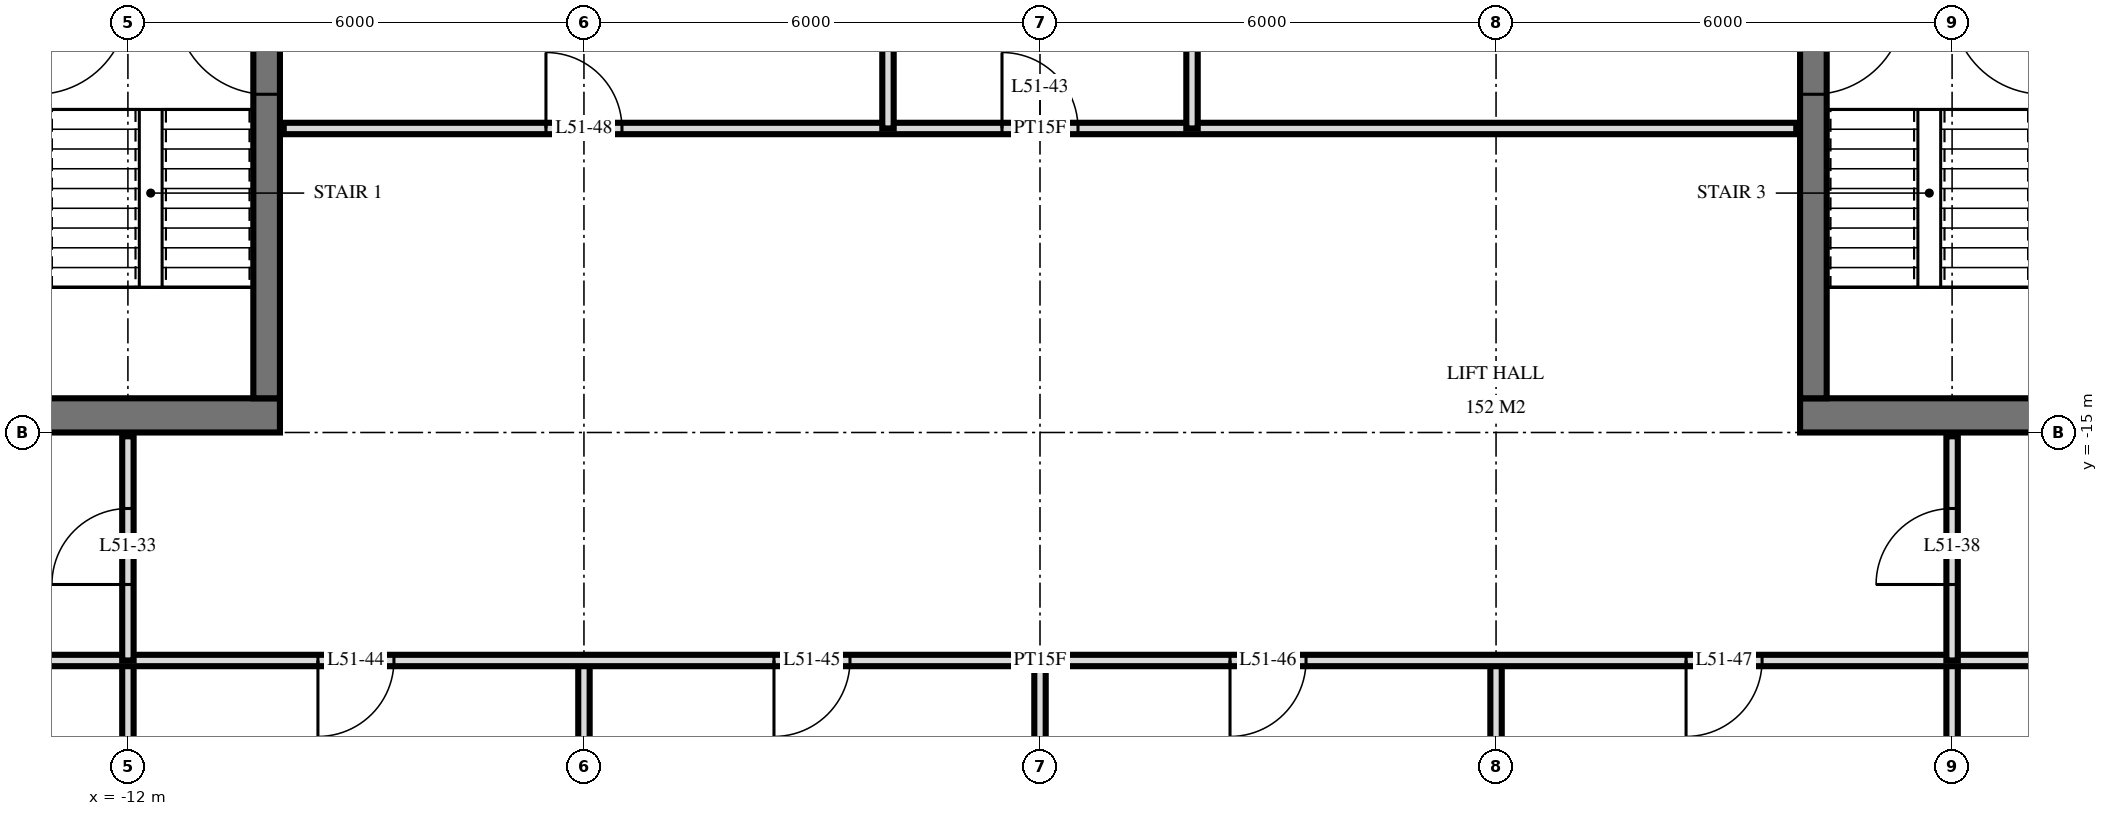
"""IFC4 building model, lengths in metres.
Left out: names, types, materials, properties, quantities, classifications, styles, units other than length and angle.
Written with IfcOpenShell. Run it as: python <this file> out.ifc"""

import sys

from ifc_helpers import new_model, si_unit, direction, frame, frame_2d, origin, place, context, subcontext, project, spatial, rectangle, extrude, element, fill, save


model = new_model("IFC4")
c1 = context("Model", 3, precision=1e-05, world=origin(), true_north=direction((0.0, 1.0)))
c2 = subcontext(c1, "Body", "Model", "MODEL_VIEW")
j1 = project(units=[si_unit("LENGTHUNIT", "METRE"), si_unit("PLANEANGLEUNIT", "RADIAN")], contexts=[c1])
p1 = place(None, origin())
s1 = spatial("IfcSite", under=j1, at=p1, CompositionType="ELEMENT")
p2 = place(p1, origin())
s2 = spatial("IfcBuilding", under=s1, at=p2, CompositionType="ELEMENT")
p3 = place(p2, frame((0.0, 0.0, 197.6)))
s3 = spatial("IfcBuildingStorey", under=s2, at=p3, CompositionType="ELEMENT", Elevation=197.6)
p4 = place(p3, frame((-24.5, -14.775, 0.0), z_axis=(0.0, 0.0, 1.0), x_axis=(1.0, 0.0, 0.0)))
e1 = element("IfcWall", 1, at=p4, inside=s3, PredefinedType="SHEAR", context=c2, shape_type="SweptSolid", body=[
    extrude(rectangle(XDim=14.5, YDim=0.45, at=frame_2d((7.25, 0.0))), origin(), (0.0, 0.0, 1.0), 3.5),
])
p5 = place(p4, frame((6.2, 0.0, 0.0)))
e2 = element("IfcOpeningElement", 2, at=p5, cuts=e1, PredefinedType="OPENING", context=c2, shape_type="SweptSolid", body=[
    extrude(rectangle(XDim=1.2, YDim=2.1, at=frame_2d((0.6, 1.05))), frame((0.0, 0.235, 0.0), z_axis=(0.0, -1.0, 0.0), x_axis=(1.0, 0.0, 0.0)), (0.0, 0.0, 1.0), 0.47),
])
p6 = place(p4, frame((9.25, 0.0, 0.0)))
e3 = element("IfcOpeningElement", 3, at=p6, cuts=e1, PredefinedType="OPENING", context=c2, shape_type="SweptSolid", body=[
    extrude(rectangle(XDim=1.1, YDim=2.1, at=frame_2d((0.55, 1.05))), frame((0.0, 0.235, 0.0), z_axis=(0.0, -1.0, 0.0), x_axis=(1.0, 0.0, 0.0)), (0.0, 0.0, 1.0), 0.47),
])
p7 = place(p4, frame((3.5, 0.0, 0.0)))
e4 = element("IfcOpeningElement", 4, at=p7, cuts=e1, PredefinedType="OPENING", context=c2, shape_type="SweptSolid", body=[
    extrude(rectangle(XDim=0.9, YDim=2.1, at=frame_2d((0.45, 1.05))), frame((0.0, 0.235, 0.0), z_axis=(0.0, -1.0, 0.0), x_axis=(1.0, 0.0, 0.0)), (0.0, 0.0, 1.0), 0.47),
])
p8 = place(p4, frame((1.05, 0.0, 0.0)))
e5 = element("IfcOpeningElement", 5, at=p8, cuts=e1, PredefinedType="OPENING", context=c2, shape_type="SweptSolid", body=[
    extrude(rectangle(XDim=1.0, YDim=2.1, at=frame_2d((0.5, 1.05))), frame((0.0, 0.235, 0.0), z_axis=(0.0, -1.0, 0.0), x_axis=(1.0, 0.0, 0.0)), (0.0, 0.0, 1.0), 0.47),
])
p9 = place(p3, frame((-10.175, -14.55, 0.0), z_axis=(0.0, 0.0, 1.0), x_axis=(0.0, 1.0, 0.0)))
e6 = element("IfcWall", 6, at=p9, inside=s3, PredefinedType="SHEAR", context=c2, shape_type="SweptSolid", body=[
    extrude(rectangle(XDim=14.1, YDim=0.35, at=frame_2d((7.05, 0.0))), origin(), (0.0, 0.0, 1.0), 3.5),
])
p10 = place(p9, frame((8.4, 0.0, 0.0)))
e7 = element("IfcOpeningElement", 7, at=p10, cuts=e6, PredefinedType="OPENING", context=c2, shape_type="SweptSolid", body=[
    extrude(rectangle(XDim=1.4, YDim=2.4, at=frame_2d((0.7, 1.2))), frame((0.0, 0.185, 0.0), z_axis=(0.0, -1.0, 0.0), x_axis=(1.0, 0.0, 0.0)), (0.0, 0.0, 1.0), 0.37),
])
p11 = place(p9, frame((10.0, 0.0, 0.0)))
e8 = element("IfcOpeningElement", 8, at=p11, cuts=e6, PredefinedType="OPENING", context=c2, shape_type="SweptSolid", body=[
    extrude(rectangle(XDim=1.4, YDim=2.4, at=frame_2d((0.7, 1.2))), frame((0.0, 0.185, 0.0), z_axis=(0.0, -1.0, 0.0), x_axis=(1.0, 0.0, 0.0)), (0.0, 0.0, 1.0), 0.37),
])
p12 = place(p9, frame((4.0, 0.0, 0.0)))
e9 = element("IfcOpeningElement", 9, at=p12, cuts=e6, PredefinedType="OPENING", context=c2, shape_type="SweptSolid", body=[
    extrude(rectangle(XDim=1.2, YDim=2.1, at=frame_2d((0.6, 1.05))), frame((0.0, 0.185, 0.0), z_axis=(0.0, -1.0, 0.0), x_axis=(1.0, 0.0, 0.0)), (0.0, 0.0, 1.0), 0.37),
])
p13 = place(p3, frame((10.0, -14.775, 0.0), z_axis=(0.0, 0.0, 1.0), x_axis=(1.0, 0.0, 0.0)))
e10 = element("IfcWall", 10, at=p13, inside=s3, PredefinedType="SHEAR", context=c2, shape_type="SweptSolid", body=[
    extrude(rectangle(XDim=14.5, YDim=0.45, at=frame_2d((7.25, 0.0))), origin(), (0.0, 0.0, 1.0), 3.5),
])
p14 = place(p13, frame((7.1, 0.0, 0.0)))
e11 = element("IfcOpeningElement", 11, at=p14, cuts=e10, PredefinedType="OPENING", context=c2, shape_type="SweptSolid", body=[
    extrude(rectangle(XDim=1.2, YDim=2.1, at=frame_2d((0.6, 1.05))), frame((0.0, 0.235, 0.0), z_axis=(0.0, -1.0, 0.0), x_axis=(1.0, 0.0, 0.0)), (0.0, 0.0, 1.0), 0.47),
])
p15 = place(p13, frame((4.15, 0.0, 0.0)))
e12 = element("IfcOpeningElement", 12, at=p15, cuts=e10, PredefinedType="OPENING", context=c2, shape_type="SweptSolid", body=[
    extrude(rectangle(XDim=1.1, YDim=2.1, at=frame_2d((0.55, 1.05))), frame((0.0, 0.235, 0.0), z_axis=(0.0, -1.0, 0.0), x_axis=(1.0, 0.0, 0.0)), (0.0, 0.0, 1.0), 0.47),
])
p16 = place(p13, frame((10.1, 0.0, 0.0)))
e13 = element("IfcOpeningElement", 13, at=p16, cuts=e10, PredefinedType="OPENING", context=c2, shape_type="SweptSolid", body=[
    extrude(rectangle(XDim=0.9, YDim=2.1, at=frame_2d((0.45, 1.05))), frame((0.0, 0.235, 0.0), z_axis=(0.0, -1.0, 0.0), x_axis=(1.0, 0.0, 0.0)), (0.0, 0.0, 1.0), 0.47),
])
p17 = place(p13, frame((12.45, 0.0, 0.0)))
e14 = element("IfcOpeningElement", 14, at=p17, cuts=e10, PredefinedType="OPENING", context=c2, shape_type="SweptSolid", body=[
    extrude(rectangle(XDim=1.0, YDim=2.1, at=frame_2d((0.5, 1.05))), frame((0.0, 0.235, 0.0), z_axis=(0.0, -1.0, 0.0), x_axis=(1.0, 0.0, 0.0)), (0.0, 0.0, 1.0), 0.47),
])
p18 = place(p3, frame((10.175, -14.55, 0.0), z_axis=(0.0, 0.0, 1.0), x_axis=(0.0, 1.0, 0.0)))
e15 = element("IfcWall", 15, at=p18, inside=s3, PredefinedType="SHEAR", context=c2, shape_type="SweptSolid", body=[
    extrude(rectangle(XDim=14.1, YDim=0.35, at=frame_2d((7.05, 0.0))), origin(), (0.0, 0.0, 1.0), 3.5),
])
p19 = place(p18, frame((8.4, 0.0, 0.0)))
e16 = element("IfcOpeningElement", 16, at=p19, cuts=e15, PredefinedType="OPENING", context=c2, shape_type="SweptSolid", body=[
    extrude(rectangle(XDim=1.4, YDim=2.4, at=frame_2d((0.7, 1.2))), frame((0.0, 0.185, 0.0), z_axis=(0.0, -1.0, 0.0), x_axis=(1.0, 0.0, 0.0)), (0.0, 0.0, 1.0), 0.37),
])
p20 = place(p18, frame((10.0, 0.0, 0.0)))
e17 = element("IfcOpeningElement", 17, at=p20, cuts=e15, PredefinedType="OPENING", context=c2, shape_type="SweptSolid", body=[
    extrude(rectangle(XDim=1.4, YDim=2.4, at=frame_2d((0.7, 1.2))), frame((0.0, 0.185, 0.0), z_axis=(0.0, -1.0, 0.0), x_axis=(1.0, 0.0, 0.0)), (0.0, 0.0, 1.0), 0.37),
])
p21 = place(p18, frame((4.0, 0.0, 0.0)))
e18 = element("IfcOpeningElement", 18, at=p21, cuts=e15, PredefinedType="OPENING", context=c2, shape_type="SweptSolid", body=[
    extrude(rectangle(XDim=1.2, YDim=2.1, at=frame_2d((0.6, 1.05))), frame((0.0, 0.185, 0.0), z_axis=(0.0, -1.0, 0.0), x_axis=(1.0, 0.0, 0.0)), (0.0, 0.0, 1.0), 0.37),
])
p22 = place(p3, frame((12.0, -18.0, 0.0), z_axis=(0.0, 0.0, 1.0), x_axis=(0.0, 1.0, 0.0)))
e19 = element("IfcWall", 19, at=p22, inside=s3, PredefinedType="PARTITIONING", context=c2, shape_type="SweptSolid", body=[
    extrude(rectangle(XDim=2.95, YDim=0.15, at=frame_2d((1.475, 0.0))), origin(), (0.0, 0.0, 1.0), 3.22),
])
p23 = place(p22, frame((1.0, 0.0, 0.0)))
e20 = element("IfcOpeningElement", 20, at=p23, cuts=e19, PredefinedType="OPENING", context=c2, shape_type="SweptSolid", body=[
    extrude(rectangle(XDim=1.0, YDim=2.1, at=frame_2d((0.5, 1.05))), frame((0.0, 0.085, 0.0), z_axis=(0.0, -1.0, 0.0), x_axis=(1.0, 0.0, 0.0)), (0.0, 0.0, 1.0), 0.17),
])
for number, where, z_axis, x_axis in (
    (21, (12.0, -29.22, 0.0), (0.0, 0.0, 1.0), (0.0, 1.0, 0.0)),
    (22, (6.0, -29.22, 0.0), (0.0, 0.0, 1.0), (0.0, 1.0, 0.0)),
):
    element("IfcWall", number, at=place(p3, frame(where, z_axis=z_axis, x_axis=x_axis)), inside=s3, PredefinedType="PARTITIONING", context=c2, shape_type="SweptSolid", body=[
        extrude(rectangle(XDim=11.22, YDim=0.15, at=frame_2d((5.61, 0.0))), origin(), (0.0, 0.0, 1.0), 3.22),
    ])
p24 = place(p3, frame((2.0, -11.0, 0.0), z_axis=(0.0, 0.0, 1.0), x_axis=(0.0, 1.0, 0.0)))
e23 = element("IfcWall", 23, at=p24, inside=s3, PredefinedType="PARTITIONING", context=c2, shape_type="SweptSolid", body=[
    extrude(rectangle(XDim=4.0, YDim=0.15, at=frame_2d((2.0, 0.0))), origin(), (0.0, 0.0, 1.0), 3.22),
])
p25 = place(p3, frame((0.0, -29.22, 0.0), z_axis=(0.0, 0.0, 1.0), x_axis=(0.0, 1.0, 0.0)))
e24 = element("IfcWall", 24, at=p25, inside=s3, PredefinedType="PARTITIONING", context=c2, shape_type="SweptSolid", body=[
    extrude(rectangle(XDim=11.22, YDim=0.15, at=frame_2d((5.61, 0.0))), origin(), (0.0, 0.0, 1.0), 3.22),
])
p26 = place(p3, frame((-2.0, -11.0, 0.0), z_axis=(0.0, 0.0, 1.0), x_axis=(0.0, 1.0, 0.0)))
e25 = element("IfcWall", 25, at=p26, inside=s3, PredefinedType="PARTITIONING", context=c2, shape_type="SweptSolid", body=[
    extrude(rectangle(XDim=4.0, YDim=0.15, at=frame_2d((2.0, 0.0))), origin(), (0.0, 0.0, 1.0), 3.22),
])
p27 = place(p3, frame((-6.0, -29.22, 0.0), z_axis=(0.0, 0.0, 1.0), x_axis=(0.0, 1.0, 0.0)))
e26 = element("IfcWall", 26, at=p27, inside=s3, PredefinedType="PARTITIONING", context=c2, shape_type="SweptSolid", body=[
    extrude(rectangle(XDim=11.22, YDim=0.15, at=frame_2d((5.61, 0.0))), origin(), (0.0, 0.0, 1.0), 3.22),
])
p28 = place(p3, frame((-12.0, -18.0, 0.0), z_axis=(0.0, 0.0, 1.0), x_axis=(0.0, 1.0, 0.0)))
e27 = element("IfcWall", 27, at=p28, inside=s3, PredefinedType="PARTITIONING", context=c2, shape_type="SweptSolid", body=[
    extrude(rectangle(XDim=2.95, YDim=0.15, at=frame_2d((1.475, 0.0))), origin(), (0.0, 0.0, 1.0), 3.22),
])
p29 = place(p28, frame((1.0, 0.0, 0.0)))
e28 = element("IfcOpeningElement", 28, at=p29, cuts=e27, PredefinedType="OPENING", context=c2, shape_type="SweptSolid", body=[
    extrude(rectangle(XDim=1.0, YDim=2.1, at=frame_2d((0.5, 1.05))), frame((0.0, 0.085, 0.0), z_axis=(0.0, -1.0, 0.0), x_axis=(1.0, 0.0, 0.0)), (0.0, 0.0, 1.0), 0.17),
])
p30 = place(p3, frame((-12.0, -29.22, 0.0), z_axis=(0.0, 0.0, 1.0), x_axis=(0.0, 1.0, 0.0)))
e29 = element("IfcWall", 29, at=p30, inside=s3, PredefinedType="PARTITIONING", context=c2, shape_type="SweptSolid", body=[
    extrude(rectangle(XDim=11.22, YDim=0.15, at=frame_2d((5.61, 0.0))), origin(), (0.0, 0.0, 1.0), 3.22),
])
p31 = place(p3, frame((-26.82, -18.0, 0.0), z_axis=(0.0, 0.0, 1.0), x_axis=(1.0, 0.0, 0.0)))
e30 = element("IfcWall", 30, at=p31, inside=s3, PredefinedType="PARTITIONING", context=c2, shape_type="SweptSolid", body=[
    extrude(rectangle(XDim=53.64, YDim=0.15, at=frame_2d((26.82, 0.0))), origin(), (0.0, 0.0, 1.0), 3.22),
])
p32 = place(p31, frame((11.97, 0.0, 0.0)))
e31 = element("IfcOpeningElement", 31, at=p32, cuts=e30, PredefinedType="OPENING", context=c2, shape_type="SweptSolid", body=[
    extrude(rectangle(XDim=1.0, YDim=2.1, at=frame_2d((0.5, 1.05))), frame((0.0, 0.085, 0.0), z_axis=(0.0, -1.0, 0.0), x_axis=(1.0, 0.0, 0.0)), (0.0, 0.0, 1.0), 0.17),
])
p33 = place(p31, frame((3.92, 0.0, 0.0)))
e32 = element("IfcOpeningElement", 32, at=p33, cuts=e30, PredefinedType="OPENING", context=c2, shape_type="SweptSolid", body=[
    extrude(rectangle(XDim=1.0, YDim=2.1, at=frame_2d((0.5, 1.05))), frame((0.0, 0.085, 0.0), z_axis=(0.0, -1.0, 0.0), x_axis=(1.0, 0.0, 0.0)), (0.0, 0.0, 1.0), 0.17),
])
p34 = place(p31, frame((5.72, 0.0, 0.0)))
e33 = element("IfcOpeningElement", 33, at=p34, cuts=e30, PredefinedType="OPENING", context=c2, shape_type="SweptSolid", body=[
    extrude(rectangle(XDim=1.0, YDim=2.1, at=frame_2d((0.5, 1.05))), frame((0.0, 0.085, 0.0), z_axis=(0.0, -1.0, 0.0), x_axis=(1.0, 0.0, 0.0)), (0.0, 0.0, 1.0), 0.17),
])
p35 = place(p31, frame((40.67, 0.0, 0.0)))
e34 = element("IfcOpeningElement", 34, at=p35, cuts=e30, PredefinedType="OPENING", context=c2, shape_type="SweptSolid", body=[
    extrude(rectangle(XDim=1.0, YDim=2.1, at=frame_2d((0.5, 1.05))), frame((0.0, 0.085, 0.0), z_axis=(0.0, -1.0, 0.0), x_axis=(1.0, 0.0, 0.0)), (0.0, 0.0, 1.0), 0.17),
])
p36 = place(p31, frame((48.72, 0.0, 0.0)))
e35 = element("IfcOpeningElement", 35, at=p36, cuts=e30, PredefinedType="OPENING", context=c2, shape_type="SweptSolid", body=[
    extrude(rectangle(XDim=1.0, YDim=2.1, at=frame_2d((0.5, 1.05))), frame((0.0, 0.085, 0.0), z_axis=(0.0, -1.0, 0.0), x_axis=(1.0, 0.0, 0.0)), (0.0, 0.0, 1.0), 0.17),
])
p37 = place(p31, frame((46.92, 0.0, 0.0)))
e36 = element("IfcOpeningElement", 36, at=p37, cuts=e30, PredefinedType="OPENING", context=c2, shape_type="SweptSolid", body=[
    extrude(rectangle(XDim=1.0, YDim=2.1, at=frame_2d((0.5, 1.05))), frame((0.0, 0.085, 0.0), z_axis=(0.0, -1.0, 0.0), x_axis=(1.0, 0.0, 0.0)), (0.0, 0.0, 1.0), 0.17),
])
p38 = place(p31, frame((17.32, 0.0, 0.0)))
e37 = element("IfcOpeningElement", 37, at=p38, cuts=e30, PredefinedType="OPENING", context=c2, shape_type="SweptSolid", body=[
    extrude(rectangle(XDim=1.0, YDim=2.1, at=frame_2d((0.5, 1.05))), frame((0.0, 0.085, 0.0), z_axis=(0.0, -1.0, 0.0), x_axis=(1.0, 0.0, 0.0)), (0.0, 0.0, 1.0), 0.17),
])
p39 = place(p31, frame((23.32, 0.0, 0.0)))
e38 = element("IfcOpeningElement", 38, at=p39, cuts=e30, PredefinedType="OPENING", context=c2, shape_type="SweptSolid", body=[
    extrude(rectangle(XDim=1.0, YDim=2.1, at=frame_2d((0.5, 1.05))), frame((0.0, 0.085, 0.0), z_axis=(0.0, -1.0, 0.0), x_axis=(1.0, 0.0, 0.0)), (0.0, 0.0, 1.0), 0.17),
])
p40 = place(p31, frame((29.32, 0.0, 0.0)))
e39 = element("IfcOpeningElement", 39, at=p40, cuts=e30, PredefinedType="OPENING", context=c2, shape_type="SweptSolid", body=[
    extrude(rectangle(XDim=1.0, YDim=2.1, at=frame_2d((0.5, 1.05))), frame((0.0, 0.085, 0.0), z_axis=(0.0, -1.0, 0.0), x_axis=(1.0, 0.0, 0.0)), (0.0, 0.0, 1.0), 0.17),
])
p41 = place(p31, frame((35.32, 0.0, 0.0)))
e40 = element("IfcOpeningElement", 40, at=p41, cuts=e30, PredefinedType="OPENING", context=c2, shape_type="SweptSolid", body=[
    extrude(rectangle(XDim=1.0, YDim=2.1, at=frame_2d((0.5, 1.05))), frame((0.0, 0.085, 0.0), z_axis=(0.0, -1.0, 0.0), x_axis=(1.0, 0.0, 0.0)), (0.0, 0.0, 1.0), 0.17),
])
p42 = place(p3, frame((-9.95, -11.0, 0.0), z_axis=(0.0, 0.0, 1.0), x_axis=(1.0, 0.0, 0.0)))
e41 = element("IfcWall", 41, at=p42, inside=s3, PredefinedType="PARTITIONING", context=c2, shape_type="SweptSolid", body=[
    extrude(rectangle(XDim=19.9, YDim=0.15, at=frame_2d((9.95, 0.0))), origin(), (0.0, 0.0, 1.0), 3.22),
])
p43 = place(p42, frame((9.45, 0.0, 0.0)))
e42 = element("IfcOpeningElement", 42, at=p43, cuts=e41, PredefinedType="OPENING", context=c2, shape_type="SweptSolid", body=[
    extrude(rectangle(XDim=1.0, YDim=2.1, at=frame_2d((0.5, 1.05))), frame((0.0, 0.085, 0.0), z_axis=(0.0, -1.0, 0.0), x_axis=(1.0, 0.0, 0.0)), (0.0, 0.0, 1.0), 0.17),
])
p44 = place(p42, frame((3.45, 0.0, 0.0)))
e43 = element("IfcOpeningElement", 43, at=p44, cuts=e41, PredefinedType="OPENING", context=c2, shape_type="SweptSolid", body=[
    extrude(rectangle(XDim=1.0, YDim=2.1, at=frame_2d((0.5, 1.05))), frame((0.0, 0.085, 0.0), z_axis=(0.0, -1.0, 0.0), x_axis=(1.0, 0.0, 0.0)), (0.0, 0.0, 1.0), 0.17),
])
p45 = place(p12, origin())
e44 = element("IfcDoor", 44, at=p45, inside=s3, OperationType="SINGLE_SWING_LEFT", PredefinedType="DOOR", context=c2, shape_type="SweptSolid", body=[
    extrude(rectangle(XDim=1.2, YDim=2.1, at=frame_2d((0.6, 1.05))), frame((0.0, 0.025, 0.0), z_axis=(0.0, -1.0, 0.0), x_axis=(1.0, 0.0, 0.0)), (0.0, 0.0, 1.0), 0.05),
])
fill(e9, e44)
p46 = place(p21, frame((0.6, 0.0, 0.0), z_axis=(0.0, 0.0, 1.0), x_axis=(-1.0, 0.0, 0.0)))
e45 = element("IfcDoor", 45, at=p46, inside=s3, OperationType="SINGLE_SWING_RIGHT", PredefinedType="DOOR", context=c2, shape_type="SweptSolid", body=[
    extrude(rectangle(XDim=1.2, YDim=2.1, at=frame_2d((0.0, 1.05))), frame((0.0, -0.025, 0.0), z_axis=(0.0, 1.0, 0.0), x_axis=(-1.0, 0.0, 0.0)), (0.0, 0.0, 1.0), 0.05),
])
fill(e18, e45)
p47 = place(p29, origin())
e46 = element("IfcDoor", 46, at=p47, inside=s3, OperationType="SINGLE_SWING_RIGHT", PredefinedType="DOOR", context=c2, shape_type="SweptSolid", body=[
    extrude(rectangle(XDim=1.0, YDim=2.1, at=frame_2d((0.5, 1.05))), frame((0.0, 0.025, 0.0), z_axis=(0.0, -1.0, 0.0), x_axis=(1.0, 0.0, 0.0)), (0.0, 0.0, 1.0), 0.05),
])
fill(e28, e46)
p48 = place(p23, origin())
e47 = element("IfcDoor", 47, at=p48, inside=s3, OperationType="SINGLE_SWING_RIGHT", PredefinedType="DOOR", context=c2, shape_type="SweptSolid", body=[
    extrude(rectangle(XDim=1.0, YDim=2.1, at=frame_2d((0.5, 1.05))), frame((0.0, 0.025, 0.0), z_axis=(0.0, -1.0, 0.0), x_axis=(1.0, 0.0, 0.0)), (0.0, 0.0, 1.0), 0.05),
])
fill(e20, e47)
p49 = place(p43, origin())
e48 = element("IfcDoor", 48, at=p49, inside=s3, OperationType="SINGLE_SWING_RIGHT", PredefinedType="DOOR", context=c2, shape_type="SweptSolid", body=[
    extrude(rectangle(XDim=1.0, YDim=2.1, at=frame_2d((0.5, 1.05))), frame((0.0, 0.025, 0.0), z_axis=(0.0, -1.0, 0.0), x_axis=(1.0, 0.0, 0.0)), (0.0, 0.0, 1.0), 0.05),
])
fill(e42, e48)
p50 = place(p38, frame((0.5, 0.0, 0.0), z_axis=(0.0, 0.0, 1.0), x_axis=(-1.0, 0.0, 0.0)))
e49 = element("IfcDoor", 49, at=p50, inside=s3, OperationType="SINGLE_SWING_LEFT", PredefinedType="DOOR", context=c2, shape_type="SweptSolid", body=[
    extrude(rectangle(XDim=1.0, YDim=2.1, at=frame_2d((0.0, 1.05))), frame((0.0, -0.025, 0.0), z_axis=(0.0, 1.0, 0.0), x_axis=(-1.0, 0.0, 0.0)), (0.0, 0.0, 1.0), 0.05),
])
fill(e37, e49)
p51 = place(p39, frame((0.5, 0.0, 0.0), z_axis=(0.0, 0.0, 1.0), x_axis=(-1.0, 0.0, 0.0)))
e50 = element("IfcDoor", 50, at=p51, inside=s3, OperationType="SINGLE_SWING_LEFT", PredefinedType="DOOR", context=c2, shape_type="SweptSolid", body=[
    extrude(rectangle(XDim=1.0, YDim=2.1, at=frame_2d((0.0, 1.05))), frame((0.0, -0.025, 0.0), z_axis=(0.0, 1.0, 0.0), x_axis=(-1.0, 0.0, 0.0)), (0.0, 0.0, 1.0), 0.05),
])
fill(e38, e50)
p52 = place(p40, frame((0.5, 0.0, 0.0), z_axis=(0.0, 0.0, 1.0), x_axis=(-1.0, 0.0, 0.0)))
e51 = element("IfcDoor", 51, at=p52, inside=s3, OperationType="SINGLE_SWING_LEFT", PredefinedType="DOOR", context=c2, shape_type="SweptSolid", body=[
    extrude(rectangle(XDim=1.0, YDim=2.1, at=frame_2d((0.0, 1.05))), frame((0.0, -0.025, 0.0), z_axis=(0.0, 1.0, 0.0), x_axis=(-1.0, 0.0, 0.0)), (0.0, 0.0, 1.0), 0.05),
])
fill(e39, e51)
p53 = place(p41, frame((0.5, 0.0, 0.0), z_axis=(0.0, 0.0, 1.0), x_axis=(-1.0, 0.0, 0.0)))
e52 = element("IfcDoor", 52, at=p53, inside=s3, OperationType="SINGLE_SWING_LEFT", PredefinedType="DOOR", context=c2, shape_type="SweptSolid", body=[
    extrude(rectangle(XDim=1.0, YDim=2.1, at=frame_2d((0.0, 1.05))), frame((0.0, -0.025, 0.0), z_axis=(0.0, 1.0, 0.0), x_axis=(-1.0, 0.0, 0.0)), (0.0, 0.0, 1.0), 0.05),
])
fill(e40, e52)
p54 = place(p44, origin())
e53 = element("IfcDoor", 53, at=p54, inside=s3, OperationType="SINGLE_SWING_RIGHT", PredefinedType="DOOR", context=c2, shape_type="SweptSolid", body=[
    extrude(rectangle(XDim=1.0, YDim=2.1, at=frame_2d((0.5, 1.05))), frame((0.0, 0.025, 0.0), z_axis=(0.0, -1.0, 0.0), x_axis=(1.0, 0.0, 0.0)), (0.0, 0.0, 1.0), 0.05),
])
fill(e43, e53)
save(model, sys.argv[1])
